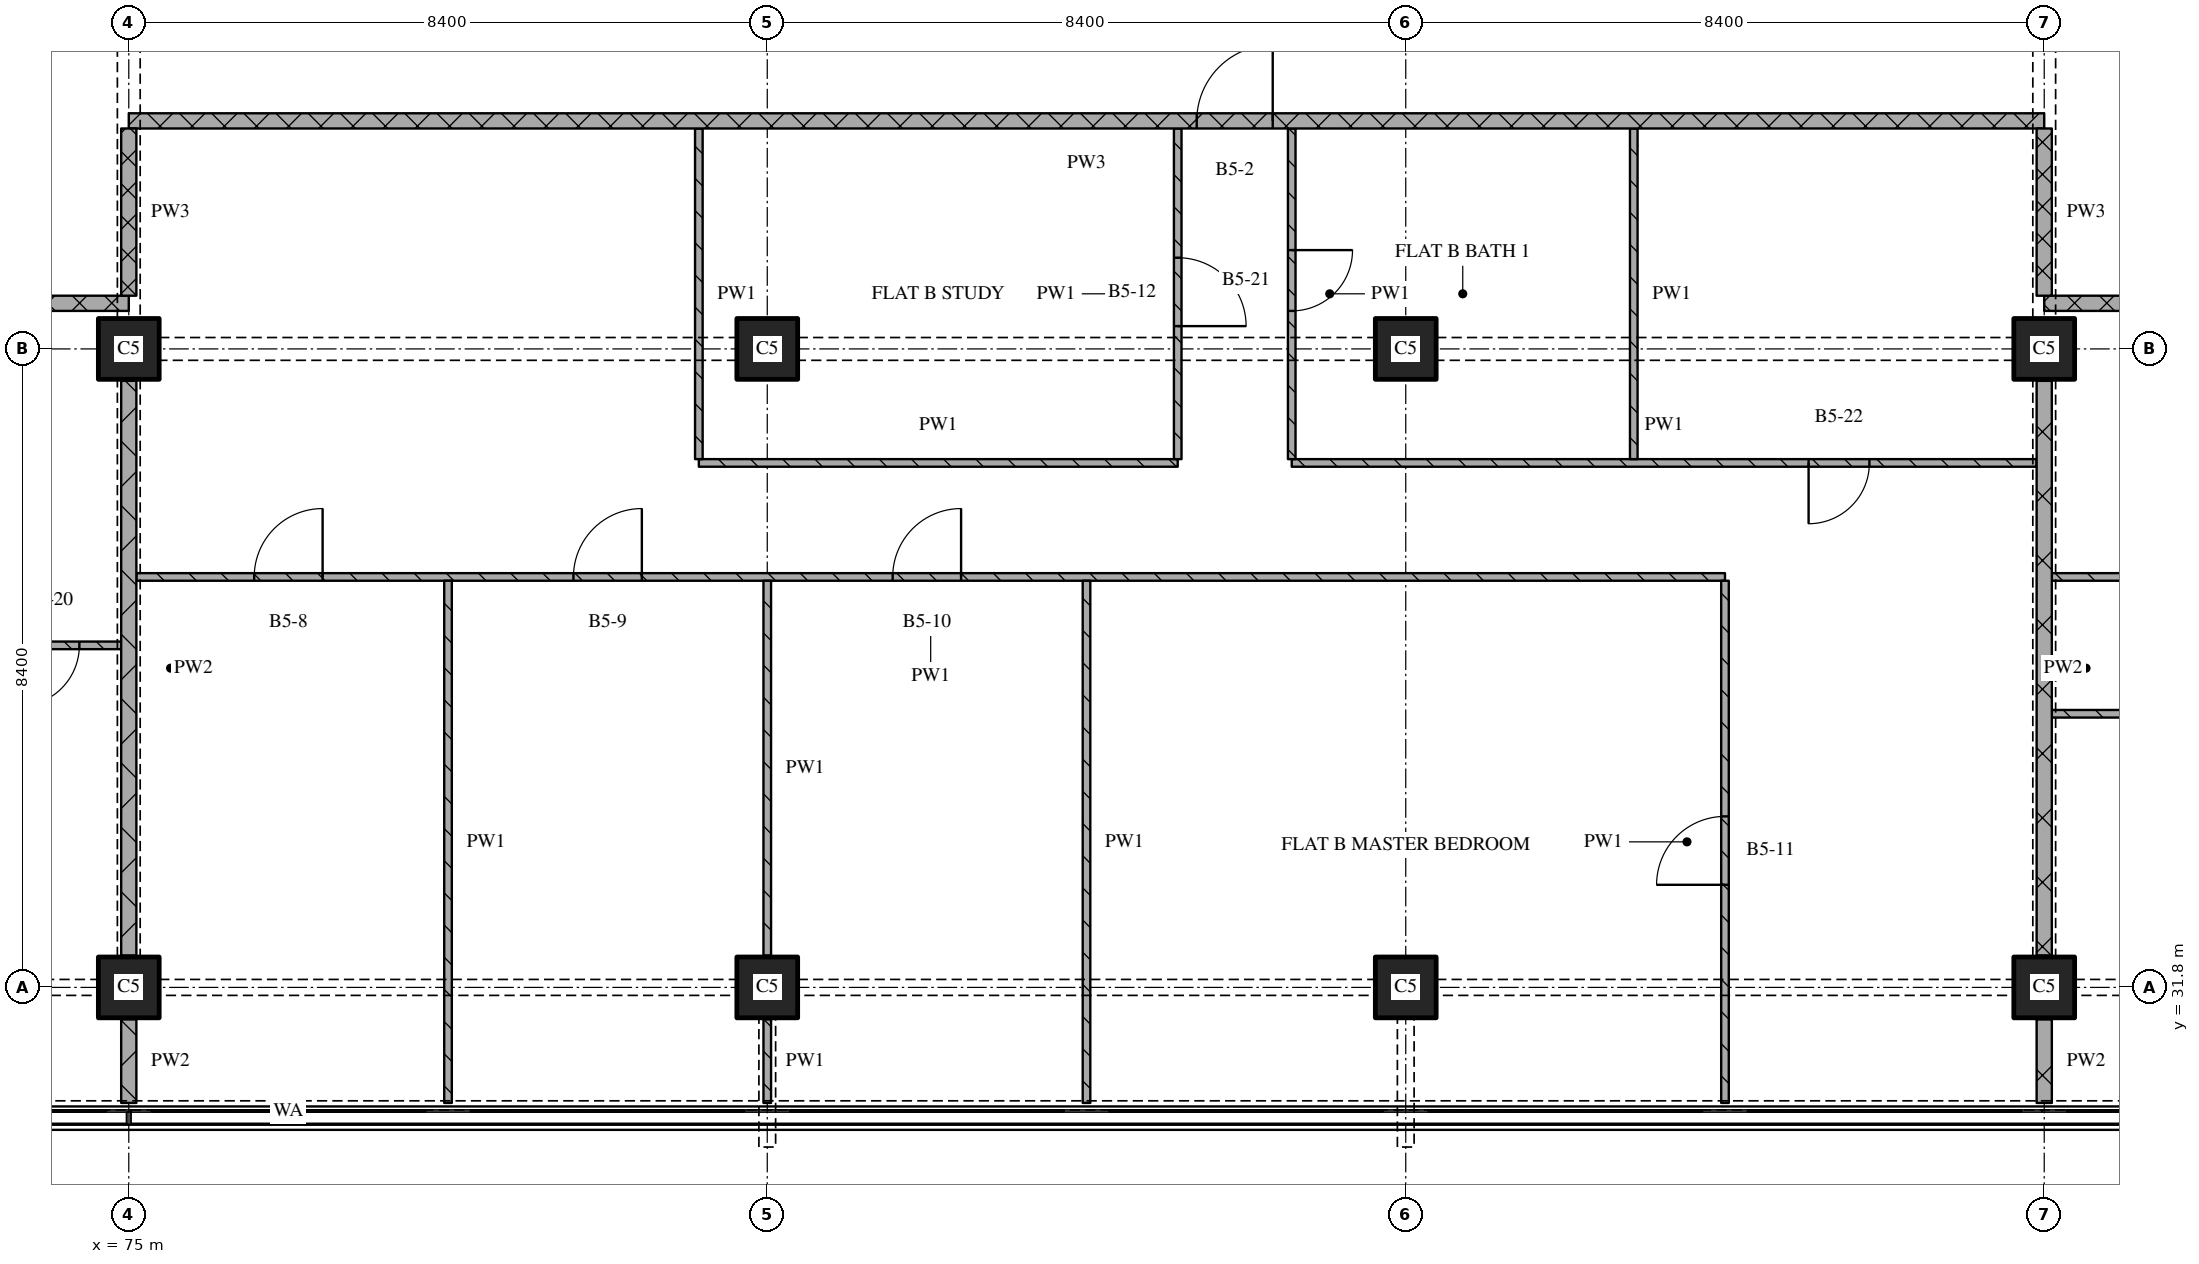
"""IFC4 building model, lengths in metres.
Left out: names, types, materials, properties, quantities, classifications, styles, units other than length and angle.
Written with IfcOpenShell. Run it as: python <this file> out.ifc"""

import sys

from ifc_helpers import new_model, si_unit, direction, frame, frame_2d, origin, origin_2d, place, context, subcontext, project, spatial, rectangle, extrude, element, fill, save


model = new_model("IFC4")
c1 = context("Model", 3, precision=1e-05, world=origin(), true_north=direction((0.0, 1.0)))
c2 = subcontext(c1, "Body", "Model", "MODEL_VIEW")
j1 = project(units=[si_unit("LENGTHUNIT", "METRE"), si_unit("PLANEANGLEUNIT", "RADIAN")], contexts=[c1])
p1 = place(None, origin())
s1 = spatial("IfcSite", under=j1, at=p1, CompositionType="ELEMENT")
p2 = place(p1, origin())
s2 = spatial("IfcBuilding", under=s1, at=p2, CompositionType="ELEMENT")
p3 = place(p2, frame((0.0, 0.0, 138.45)))
s3 = spatial("IfcBuildingStorey", under=s2, at=p3, CompositionType="ELEMENT", Elevation=138.45)
for number, where, z_axis, x_axis in (
    (1, (75.0, 31.8, 0.0), (0.0, 0.0, 1.0), (1.0, 0.0, 0.0)),
    (2, (75.0, 40.2, 0.0), (0.0, 0.0, 1.0), (1.0, 0.0, 0.0)),
    (3, (83.4, 31.8, 0.0), (0.0, 0.0, 1.0), (1.0, 0.0, 0.0)),
    (4, (83.4, 40.2, 0.0), (0.0, 0.0, 1.0), (1.0, 0.0, 0.0)),
    (5, (91.8, 31.8, 0.0), (0.0, 0.0, 1.0), (1.0, 0.0, 0.0)),
    (6, (91.8, 40.2, 0.0), (0.0, 0.0, 1.0), (1.0, 0.0, 0.0)),
    (7, (100.2, 31.8, 0.0), (0.0, 0.0, 1.0), (1.0, 0.0, 0.0)),
    (8, (100.2, 40.2, 0.0), (0.0, 0.0, 1.0), (1.0, 0.0, 0.0)),
):
    element("IfcColumn", number, at=place(p3, frame(where, z_axis=z_axis, x_axis=x_axis)), inside=s3, PredefinedType="COLUMN", context=c2, shape_type="SweptSolid", body=[
        extrude(rectangle(XDim=0.8, YDim=0.8, at=origin_2d()), origin(), (0.0, 0.0, 1.0), 3.6),
    ])
p4 = place(p3, frame((117.0, 35.4, 0.0), z_axis=(0.0, 0.0, 1.0), x_axis=(-1.0, 0.0, 0.0)))
e9 = element("IfcWall", 9, at=p4, inside=s3, PredefinedType="PARTITIONING", context=c2, shape_type="SweptSolid", body=[
    extrude(rectangle(XDim=16.7, YDim=0.1, at=frame_2d((8.35, 0.0))), origin(), (0.0, 0.0, 1.0), 3.3),
])
p5 = place(p4, frame((7.95, 0.0, 0.0)))
e10 = element("IfcOpeningElement", 10, at=p5, cuts=e9, PredefinedType="OPENING", context=c2, shape_type="SweptSolid", body=[
    extrude(rectangle(XDim=0.9, YDim=2.1, at=frame_2d((0.45, 1.05))), frame((0.0, 0.06, 0.0), z_axis=(0.0, -1.0, 0.0), x_axis=(1.0, 0.0, 0.0)), (0.0, 0.0, 1.0), 0.12),
])
p6 = place(p4, frame((14.25, 0.0, 0.0)))
e11 = element("IfcOpeningElement", 11, at=p6, cuts=e9, PredefinedType="OPENING", context=c2, shape_type="SweptSolid", body=[
    extrude(rectangle(XDim=0.9, YDim=2.1, at=frame_2d((0.45, 1.05))), frame((0.0, 0.06, 0.0), z_axis=(0.0, -1.0, 0.0), x_axis=(1.0, 0.0, 0.0)), (0.0, 0.0, 1.0), 0.12),
])
p7 = place(p3, frame((68.4, 36.3, 0.0), z_axis=(0.0, 0.0, 1.0), x_axis=(1.0, 0.0, 0.0)))
e12 = element("IfcWall", 12, at=p7, inside=s3, PredefinedType="PARTITIONING", context=c2, shape_type="SweptSolid", body=[
    extrude(rectangle(XDim=6.5, YDim=0.1, at=frame_2d((3.25, 0.0))), origin(), (0.0, 0.0, 1.0), 3.3),
])
p8 = place(p7, frame((5.15, 0.0, 0.0)))
e13 = element("IfcOpeningElement", 13, at=p8, cuts=e12, PredefinedType="OPENING", context=c2, shape_type="SweptSolid", body=[
    extrude(rectangle(XDim=0.8, YDim=2.1, at=frame_2d((0.4, 1.05))), frame((0.0, 0.06, 0.0), z_axis=(0.0, -1.0, 0.0), x_axis=(1.0, 0.0, 0.0)), (0.0, 0.0, 1.0), 0.12),
])
p9 = place(p3, frame((96.0, 37.2, 0.0), z_axis=(0.0, 0.0, 1.0), x_axis=(-1.0, 0.0, 0.0)))
e14 = element("IfcWall", 14, at=p9, inside=s3, PredefinedType="PARTITIONING", context=c2, shape_type="SweptSolid", body=[
    extrude(rectangle(XDim=20.9, YDim=0.1, at=frame_2d((10.45, 0.0))), origin(), (0.0, 0.0, 1.0), 3.3),
])
p10 = place(p9, frame((10.05, 0.0, 0.0)))
e15 = element("IfcOpeningElement", 15, at=p10, cuts=e14, PredefinedType="OPENING", context=c2, shape_type="SweptSolid", body=[
    extrude(rectangle(XDim=0.9, YDim=2.1, at=frame_2d((0.45, 1.05))), frame((0.0, 0.06, 0.0), z_axis=(0.0, -1.0, 0.0), x_axis=(1.0, 0.0, 0.0)), (0.0, 0.0, 1.0), 0.12),
])
p11 = place(p9, frame((14.25, 0.0, 0.0)))
e16 = element("IfcOpeningElement", 16, at=p11, cuts=e14, PredefinedType="OPENING", context=c2, shape_type="SweptSolid", body=[
    extrude(rectangle(XDim=0.9, YDim=2.1, at=frame_2d((0.45, 1.05))), frame((0.0, 0.06, 0.0), z_axis=(0.0, -1.0, 0.0), x_axis=(1.0, 0.0, 0.0)), (0.0, 0.0, 1.0), 0.12),
])
p12 = place(p9, frame((18.45, 0.0, 0.0)))
e17 = element("IfcOpeningElement", 17, at=p12, cuts=e14, PredefinedType="OPENING", context=c2, shape_type="SweptSolid", body=[
    extrude(rectangle(XDim=0.9, YDim=2.1, at=frame_2d((0.45, 1.05))), frame((0.0, 0.06, 0.0), z_axis=(0.0, -1.0, 0.0), x_axis=(1.0, 0.0, 0.0)), (0.0, 0.0, 1.0), 0.12),
])
p13 = place(p3, frame((100.3, 37.2, 0.0), z_axis=(0.0, 0.0, 1.0), x_axis=(1.0, 0.0, 0.0)))
e18 = element("IfcWall", 18, at=p13, inside=s3, PredefinedType="PARTITIONING", context=c2, shape_type="SweptSolid", body=[
    extrude(rectangle(XDim=10.1, YDim=0.1, at=frame_2d((5.05, 0.0))), origin(), (0.0, 0.0, 1.0), 3.3),
])
p14 = place(p13, frame((1.75, 0.0, 0.0)))
e19 = element("IfcOpeningElement", 19, at=p14, cuts=e18, PredefinedType="OPENING", context=c2, shape_type="SweptSolid", body=[
    extrude(rectangle(XDim=0.8, YDim=2.1, at=frame_2d((0.4, 1.05))), frame((0.0, 0.06, 0.0), z_axis=(0.0, -1.0, 0.0), x_axis=(1.0, 0.0, 0.0)), (0.0, 0.0, 1.0), 0.12),
])
p15 = place(p3, frame((82.5, 38.7, 0.0), z_axis=(0.0, 0.0, 1.0), x_axis=(1.0, 0.0, 0.0)))
e20 = element("IfcWall", 20, at=p15, inside=s3, PredefinedType="PARTITIONING", context=c2, shape_type="SweptSolid", body=[
    extrude(rectangle(XDim=6.3, YDim=0.1, at=frame_2d((3.15, 0.0))), origin(), (0.0, 0.0, 1.0), 3.3),
])
p16 = place(p3, frame((90.3, 38.7, 0.0), z_axis=(0.0, 0.0, 1.0), x_axis=(1.0, 0.0, 0.0)))
e21 = element("IfcWall", 21, at=p16, inside=s3, PredefinedType="PARTITIONING", context=c2, shape_type="SweptSolid", body=[
    extrude(rectangle(XDim=9.8, YDim=0.1, at=frame_2d((4.9, 0.0))), origin(), (0.0, 0.0, 1.0), 3.3),
])
p17 = place(p16, frame((6.8, 0.0, 0.0)))
e22 = element("IfcOpeningElement", 22, at=p17, cuts=e21, PredefinedType="OPENING", context=c2, shape_type="SweptSolid", body=[
    extrude(rectangle(XDim=0.8, YDim=2.1, at=frame_2d((0.4, 1.05))), frame((0.0, 0.06, 0.0), z_axis=(0.0, -1.0, 0.0), x_axis=(1.0, 0.0, 0.0)), (0.0, 0.0, 1.0), 0.12),
])
p18 = place(p3, frame((75.0, 40.8, 0.0), z_axis=(0.0, 0.0, 1.0), x_axis=(-1.0, 0.0, 0.0)))
e23 = element("IfcWall", 23, at=p18, inside=s3, PredefinedType="PARTITIONING", context=c2, shape_type="SweptSolid", body=[
    extrude(rectangle(XDim=24.18, YDim=0.2, at=frame_2d((12.09, 0.0))), origin(), (0.0, 0.0, 1.0), 3.3),
])
p19 = place(p18, frame((6.85, 0.0, 0.0)))
e24 = element("IfcOpeningElement", 24, at=p19, cuts=e23, PredefinedType="OPENING", context=c2, shape_type="SweptSolid", body=[
    extrude(rectangle(XDim=1.0, YDim=2.1, at=frame_2d((0.5, 1.05))), frame((0.0, 0.11, 0.0), z_axis=(0.0, -1.0, 0.0), x_axis=(1.0, 0.0, 0.0)), (0.0, 0.0, 1.0), 0.22),
])
p20 = place(p3, frame((124.38, 40.8, 0.0), z_axis=(0.0, 0.0, 1.0), x_axis=(-1.0, 0.0, 0.0)))
e25 = element("IfcWall", 25, at=p20, inside=s3, PredefinedType="PARTITIONING", context=c2, shape_type="SweptSolid", body=[
    extrude(rectangle(XDim=24.18, YDim=0.2, at=frame_2d((12.09, 0.0))), origin(), (0.0, 0.0, 1.0), 3.3),
])
p21 = place(p20, frame((12.73, 0.0, 0.0)))
e26 = element("IfcOpeningElement", 26, at=p21, cuts=e25, PredefinedType="OPENING", context=c2, shape_type="SweptSolid", body=[
    extrude(rectangle(XDim=1.0, YDim=2.1, at=frame_2d((0.5, 1.05))), frame((0.0, 0.11, 0.0), z_axis=(0.0, -1.0, 0.0), x_axis=(1.0, 0.0, 0.0)), (0.0, 0.0, 1.0), 0.22),
])
p22 = place(p3, frame((100.2, 43.2, 0.0), z_axis=(0.0, 0.0, 1.0), x_axis=(-1.0, 0.0, 0.0)))
e27 = element("IfcWall", 27, at=p22, inside=s3, PredefinedType="PARTITIONING", context=c2, shape_type="SweptSolid", body=[
    extrude(rectangle(XDim=25.2, YDim=0.2, at=frame_2d((12.6, 0.0))), origin(), (0.0, 0.0, 1.0), 3.3),
])
p23 = place(p22, frame((10.15, 0.0, 0.0)))
e28 = element("IfcOpeningElement", 28, at=p23, cuts=e27, PredefinedType="OPENING", context=c2, shape_type="SweptSolid", body=[
    extrude(rectangle(XDim=1.0, YDim=2.1, at=frame_2d((0.5, 1.05))), frame((0.0, 0.11, 0.0), z_axis=(0.0, -1.0, 0.0), x_axis=(1.0, 0.0, 0.0)), (0.0, 0.0, 1.0), 0.22),
])
p24 = place(p3, frame((75.0, 43.1, 0.0), z_axis=(0.0, 0.0, 1.0), x_axis=(0.0, -1.0, 0.0)))
e29 = element("IfcWall", 29, at=p24, inside=s3, PredefinedType="PARTITIONING", context=c2, shape_type="SweptSolid", body=[
    extrude(rectangle(XDim=2.2, YDim=0.2, at=frame_2d((1.1, 0.0))), origin(), (0.0, 0.0, 1.0), 2.41),
])
p25 = place(p3, frame((75.0, 31.38, 0.0), z_axis=(0.0, 0.0, 1.0), x_axis=(0.0, -1.0, 0.0)))
e30 = element("IfcWall", 30, at=p25, inside=s3, PredefinedType="PARTITIONING", context=c2, shape_type="SweptSolid", body=[
    extrude(rectangle(XDim=1.1, YDim=0.2, at=frame_2d((0.55, 0.0))), origin(), (0.0, 0.0, 1.0), 3.3),
])
p26 = place(p3, frame((75.0, 39.78, 0.0), z_axis=(0.0, 0.0, 1.0), x_axis=(0.0, -1.0, 0.0)))
e31 = element("IfcWall", 31, at=p26, inside=s3, PredefinedType="PARTITIONING", context=c2, shape_type="SweptSolid", body=[
    extrude(rectangle(XDim=7.56, YDim=0.2, at=frame_2d((3.78, 0.0))), origin(), (0.0, 0.0, 1.0), 2.81),
])
p27 = place(p3, frame((79.2, 37.15, 0.0), z_axis=(0.0, 0.0, 1.0), x_axis=(0.0, -1.0, 0.0)))
e32 = element("IfcWall", 32, at=p27, inside=s3, PredefinedType="PARTITIONING", context=c2, shape_type="SweptSolid", body=[
    extrude(rectangle(XDim=6.87, YDim=0.1, at=frame_2d((3.435, 0.0))), origin(), (0.0, 0.0, 1.0), 3.3),
])
p28 = place(p3, frame((82.5, 43.1, 0.0), z_axis=(0.0, 0.0, 1.0), x_axis=(0.0, -1.0, 0.0)))
e33 = element("IfcWall", 33, at=p28, inside=s3, PredefinedType="PARTITIONING", context=c2, shape_type="SweptSolid", body=[
    extrude(rectangle(XDim=4.35, YDim=0.1, at=frame_2d((2.175, 0.0))), origin(), (0.0, 0.0, 1.0), 3.3),
])
p29 = place(p3, frame((83.4, 31.38, 0.0), z_axis=(0.0, 0.0, 1.0), x_axis=(0.0, -1.0, 0.0)))
e34 = element("IfcWall", 34, at=p29, inside=s3, PredefinedType="PARTITIONING", context=c2, shape_type="SweptSolid", body=[
    extrude(rectangle(XDim=1.1, YDim=0.1, at=frame_2d((0.55, 0.0))), origin(), (0.0, 0.0, 1.0), 3.3),
])
p30 = place(p3, frame((83.4, 37.15, 0.0), z_axis=(0.0, 0.0, 1.0), x_axis=(0.0, -1.0, 0.0)))
e35 = element("IfcWall", 35, at=p30, inside=s3, PredefinedType="PARTITIONING", context=c2, shape_type="SweptSolid", body=[
    extrude(rectangle(XDim=4.93, YDim=0.1, at=frame_2d((2.465, 0.0))), origin(), (0.0, 0.0, 1.0), 3.3),
])
p31 = place(p3, frame((87.6, 37.15, 0.0), z_axis=(0.0, 0.0, 1.0), x_axis=(0.0, -1.0, 0.0)))
e36 = element("IfcWall", 36, at=p31, inside=s3, PredefinedType="PARTITIONING", context=c2, shape_type="SweptSolid", body=[
    extrude(rectangle(XDim=6.87, YDim=0.1, at=frame_2d((3.435, 0.0))), origin(), (0.0, 0.0, 1.0), 3.3),
])
p32 = place(p3, frame((88.8, 38.75, 0.0), z_axis=(0.0, 0.0, 1.0), x_axis=(0.0, 1.0, 0.0)))
e37 = element("IfcWall", 37, at=p32, inside=s3, PredefinedType="PARTITIONING", context=c2, shape_type="SweptSolid", body=[
    extrude(rectangle(XDim=4.35, YDim=0.1, at=frame_2d((2.175, 0.0))), origin(), (0.0, 0.0, 1.0), 3.3),
])
p33 = place(p32, frame((1.75, 0.0, 0.0)))
e38 = element("IfcOpeningElement", 38, at=p33, cuts=e37, PredefinedType="OPENING", context=c2, shape_type="SweptSolid", body=[
    extrude(rectangle(XDim=0.9, YDim=2.1, at=frame_2d((0.45, 1.05))), frame((0.0, 0.06, 0.0), z_axis=(0.0, -1.0, 0.0), x_axis=(1.0, 0.0, 0.0)), (0.0, 0.0, 1.0), 0.12),
])
p34 = place(p3, frame((90.3, 43.1, 0.0), z_axis=(0.0, 0.0, 1.0), x_axis=(0.0, -1.0, 0.0)))
e39 = element("IfcWall", 39, at=p34, inside=s3, PredefinedType="PARTITIONING", context=c2, shape_type="SweptSolid", body=[
    extrude(rectangle(XDim=4.35, YDim=0.1, at=frame_2d((2.175, 0.0))), origin(), (0.0, 0.0, 1.0), 3.3),
])
p35 = place(p34, frame((1.6, 0.0, 0.0)))
e40 = element("IfcOpeningElement", 40, at=p35, cuts=e39, PredefinedType="OPENING", context=c2, shape_type="SweptSolid", body=[
    extrude(rectangle(XDim=0.8, YDim=2.1, at=frame_2d((0.4, 1.05))), frame((0.0, 0.06, 0.0), z_axis=(0.0, -1.0, 0.0), x_axis=(1.0, 0.0, 0.0)), (0.0, 0.0, 1.0), 0.12),
])
p36 = place(p3, frame((94.8, 43.1, 0.0), z_axis=(0.0, 0.0, 1.0), x_axis=(0.0, -1.0, 0.0)))
e41 = element("IfcWall", 41, at=p36, inside=s3, PredefinedType="PARTITIONING", context=c2, shape_type="SweptSolid", body=[
    extrude(rectangle(XDim=4.35, YDim=0.1, at=frame_2d((2.175, 0.0))), origin(), (0.0, 0.0, 1.0), 3.3),
])
p37 = place(p3, frame((96.0, 30.28, 0.0), z_axis=(0.0, 0.0, 1.0), x_axis=(0.0, 1.0, 0.0)))
e42 = element("IfcWall", 42, at=p37, inside=s3, PredefinedType="PARTITIONING", context=c2, shape_type="SweptSolid", body=[
    extrude(rectangle(XDim=6.87, YDim=0.1, at=frame_2d((3.435, 0.0))), origin(), (0.0, 0.0, 1.0), 3.3),
])
p38 = place(p37, frame((2.87, 0.0, 0.0)))
e43 = element("IfcOpeningElement", 43, at=p38, cuts=e42, PredefinedType="OPENING", context=c2, shape_type="SweptSolid", body=[
    extrude(rectangle(XDim=0.9, YDim=2.1, at=frame_2d((0.45, 1.05))), frame((0.0, 0.06, 0.0), z_axis=(0.0, -1.0, 0.0), x_axis=(1.0, 0.0, 0.0)), (0.0, 0.0, 1.0), 0.12),
])
p39 = place(p3, frame((100.2, 43.1, 0.0), z_axis=(0.0, 0.0, 1.0), x_axis=(0.0, -1.0, 0.0)))
e44 = element("IfcWall", 44, at=p39, inside=s3, PredefinedType="PARTITIONING", context=c2, shape_type="SweptSolid", body=[
    extrude(rectangle(XDim=2.2, YDim=0.2, at=frame_2d((1.1, 0.0))), origin(), (0.0, 0.0, 1.0), 2.41),
])
p40 = place(p3, frame((100.2, 31.38, 0.0), z_axis=(0.0, 0.0, 1.0), x_axis=(0.0, -1.0, 0.0)))
e45 = element("IfcWall", 45, at=p40, inside=s3, PredefinedType="PARTITIONING", context=c2, shape_type="SweptSolid", body=[
    extrude(rectangle(XDim=1.1, YDim=0.2, at=frame_2d((0.55, 0.0))), origin(), (0.0, 0.0, 1.0), 3.3),
])
p41 = place(p3, frame((100.2, 39.78, 0.0), z_axis=(0.0, 0.0, 1.0), x_axis=(0.0, -1.0, 0.0)))
e46 = element("IfcWall", 46, at=p41, inside=s3, PredefinedType="PARTITIONING", context=c2, shape_type="SweptSolid", body=[
    extrude(rectangle(XDim=7.56, YDim=0.2, at=frame_2d((3.78, 0.0))), origin(), (0.0, 0.0, 1.0), 2.81),
])
p42 = place(p8, origin())
e47 = element("IfcDoor", 47, at=p42, inside=s3, OperationType="SINGLE_SWING_RIGHT", PredefinedType="DOOR", context=c2, shape_type="SweptSolid", body=[
    extrude(rectangle(XDim=0.8, YDim=2.1, at=frame_2d((0.4, 1.05))), frame((0.0, 0.025, 0.0), z_axis=(0.0, -1.0, 0.0), x_axis=(1.0, 0.0, 0.0)), (0.0, 0.0, 1.0), 0.05),
])
fill(e13, e47)
p43 = place(p10, origin())
e48 = element("IfcDoor", 48, at=p43, inside=s3, OperationType="SINGLE_SWING_RIGHT", PredefinedType="DOOR", context=c2, shape_type="SweptSolid", body=[
    extrude(rectangle(XDim=0.9, YDim=2.1, at=frame_2d((0.45, 1.05))), frame((0.0, 0.025, 0.0), z_axis=(0.0, -1.0, 0.0), x_axis=(1.0, 0.0, 0.0)), (0.0, 0.0, 1.0), 0.05),
])
fill(e15, e48)
p44 = place(p11, origin())
e49 = element("IfcDoor", 49, at=p44, inside=s3, OperationType="SINGLE_SWING_RIGHT", PredefinedType="DOOR", context=c2, shape_type="SweptSolid", body=[
    extrude(rectangle(XDim=0.9, YDim=2.1, at=frame_2d((0.45, 1.05))), frame((0.0, 0.025, 0.0), z_axis=(0.0, -1.0, 0.0), x_axis=(1.0, 0.0, 0.0)), (0.0, 0.0, 1.0), 0.05),
])
fill(e16, e49)
p45 = place(p12, origin())
e50 = element("IfcDoor", 50, at=p45, inside=s3, OperationType="SINGLE_SWING_RIGHT", PredefinedType="DOOR", context=c2, shape_type="SweptSolid", body=[
    extrude(rectangle(XDim=0.9, YDim=2.1, at=frame_2d((0.45, 1.05))), frame((0.0, 0.025, 0.0), z_axis=(0.0, -1.0, 0.0), x_axis=(1.0, 0.0, 0.0)), (0.0, 0.0, 1.0), 0.05),
])
fill(e17, e50)
p46 = place(p17, origin())
e51 = element("IfcDoor", 51, at=p46, inside=s3, OperationType="SINGLE_SWING_RIGHT", PredefinedType="DOOR", context=c2, shape_type="SweptSolid", body=[
    extrude(rectangle(XDim=0.8, YDim=2.1, at=frame_2d((0.4, 1.05))), frame((0.0, 0.025, 0.0), z_axis=(0.0, -1.0, 0.0), x_axis=(1.0, 0.0, 0.0)), (0.0, 0.0, 1.0), 0.05),
])
fill(e22, e51)
p47 = place(p23, origin())
e52 = element("IfcDoor", 52, at=p47, inside=s3, OperationType="SINGLE_SWING_RIGHT", PredefinedType="DOOR", context=c2, shape_type="SweptSolid", body=[
    extrude(rectangle(XDim=1.0, YDim=2.1, at=frame_2d((0.5, 1.05))), frame((0.0, 0.025, 0.0), z_axis=(0.0, -1.0, 0.0), x_axis=(1.0, 0.0, 0.0)), (0.0, 0.0, 1.0), 0.05),
])
fill(e28, e52)
p48 = place(p33, origin())
e53 = element("IfcDoor", 53, at=p48, inside=s3, OperationType="SINGLE_SWING_RIGHT", PredefinedType="DOOR", context=c2, shape_type="SweptSolid", body=[
    extrude(rectangle(XDim=0.9, YDim=2.1, at=frame_2d((0.45, 1.05))), frame((0.0, 0.025, 0.0), z_axis=(0.0, -1.0, 0.0), x_axis=(1.0, 0.0, 0.0)), (0.0, 0.0, 1.0), 0.05),
])
fill(e38, e53)
p49 = place(p35, origin())
e54 = element("IfcDoor", 54, at=p49, inside=s3, OperationType="SINGLE_SWING_LEFT", PredefinedType="DOOR", context=c2, shape_type="SweptSolid", body=[
    extrude(rectangle(XDim=0.8, YDim=2.1, at=frame_2d((0.4, 1.05))), frame((0.0, 0.025, 0.0), z_axis=(0.0, -1.0, 0.0), x_axis=(1.0, 0.0, 0.0)), (0.0, 0.0, 1.0), 0.05),
])
fill(e40, e54)
p50 = place(p38, origin())
e55 = element("IfcDoor", 55, at=p50, inside=s3, OperationType="SINGLE_SWING_LEFT", PredefinedType="DOOR", context=c2, shape_type="SweptSolid", body=[
    extrude(rectangle(XDim=0.9, YDim=2.1, at=frame_2d((0.45, 1.05))), frame((0.0, 0.025, 0.0), z_axis=(0.0, -1.0, 0.0), x_axis=(1.0, 0.0, 0.0)), (0.0, 0.0, 1.0), 0.05),
])
fill(e43, e55)
save(model, sys.argv[1])
